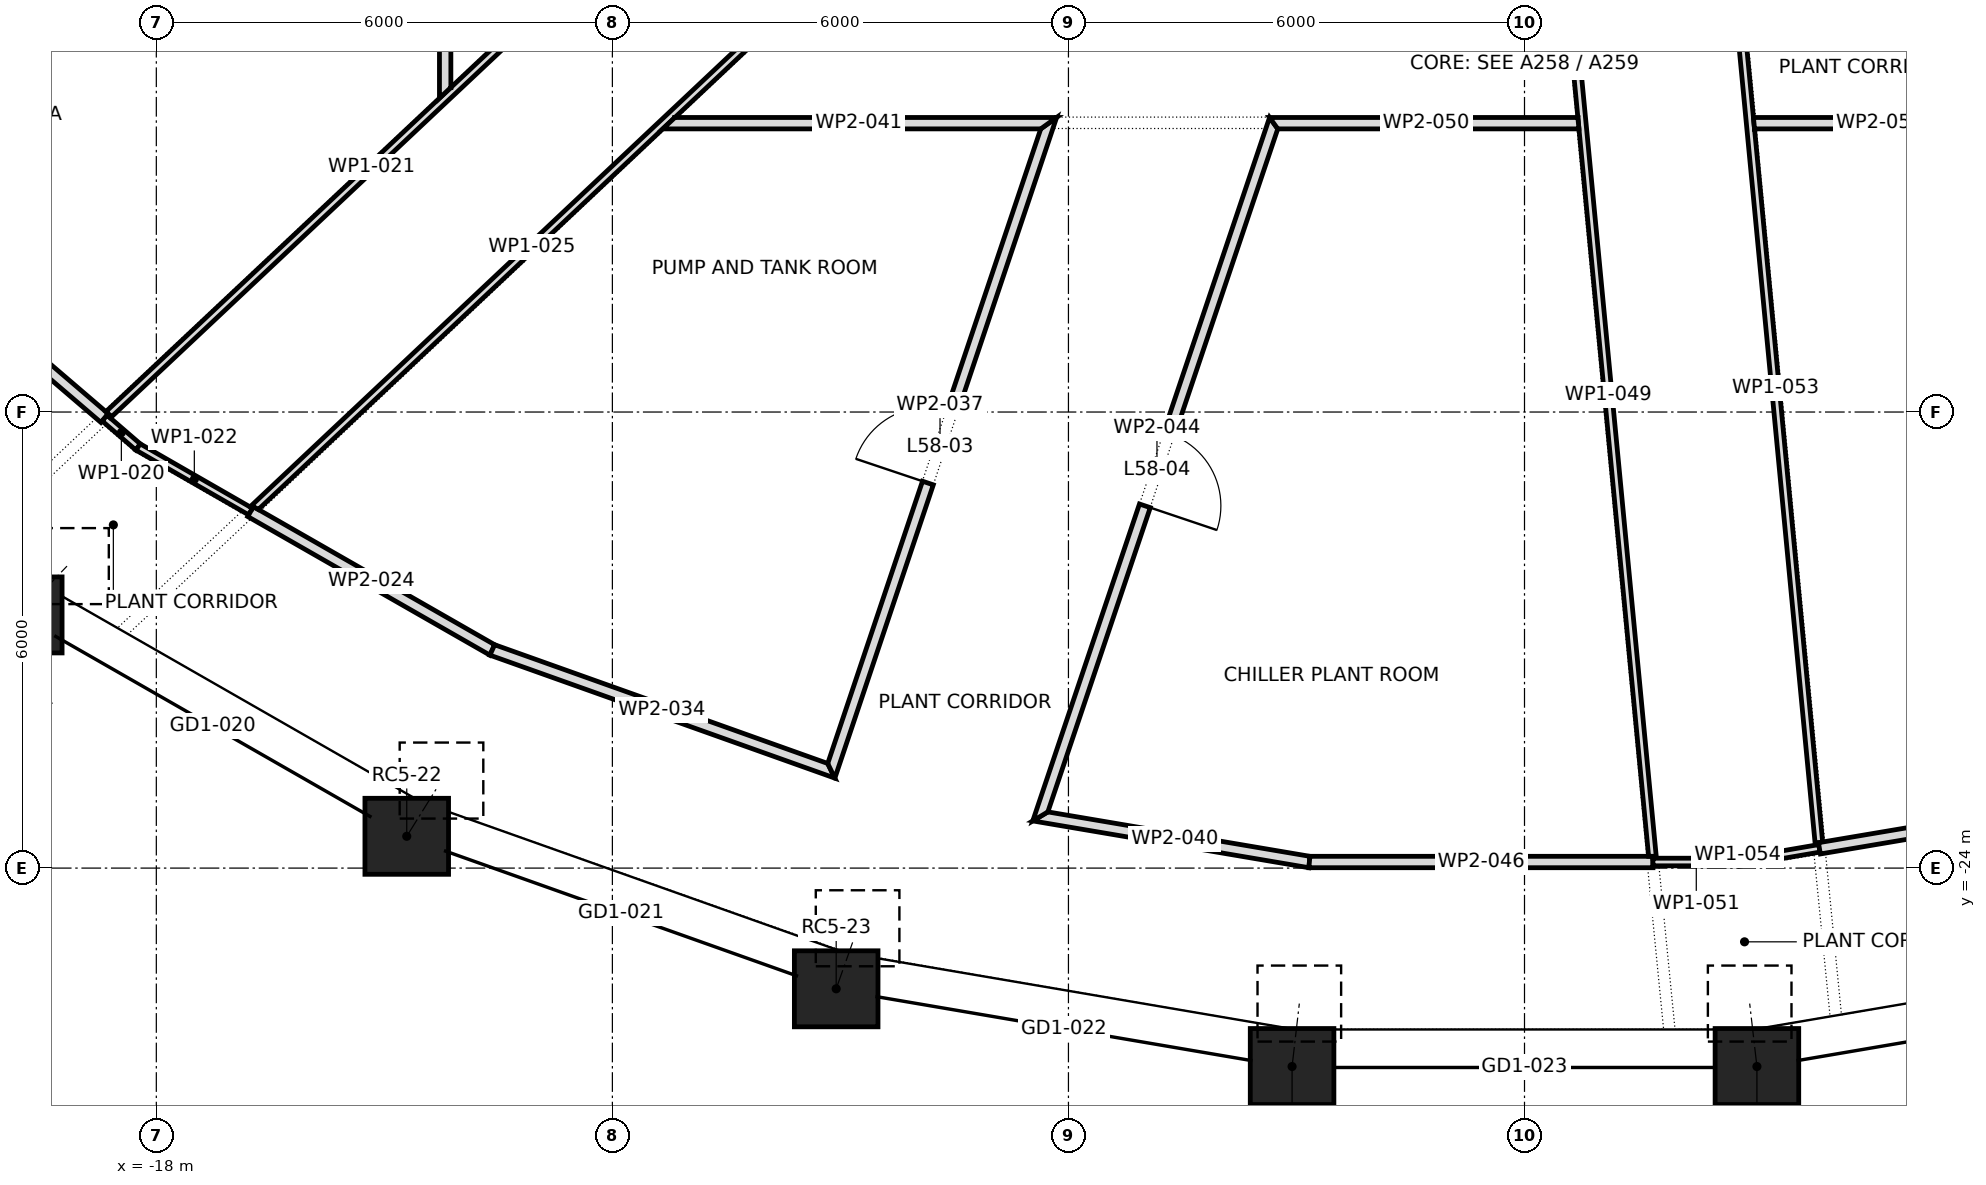
"""IFC4 building model, lengths in metres.
Left out: names, types, materials, properties, quantities, classifications, styles, units other than length and angle.
Written with IfcOpenShell. Run it as: python <this file> out.ifc"""

import sys

from ifc_helpers import new_model, si_unit, direction, frame, frame_2d, origin, origin_2d, place, context, subcontext, project, spatial, polyline, rectangle, outline, extrude, element, fill, save


model = new_model("IFC4")
c1 = context("Model", 3, precision=1e-05, world=origin(), true_north=direction((0.0, 1.0)))
c2 = subcontext(c1, "Body", "Model", "MODEL_VIEW")
j1 = project(units=[si_unit("LENGTHUNIT", "METRE"), si_unit("PLANEANGLEUNIT", "RADIAN")], contexts=[c1])
p1 = place(None, origin())
s1 = spatial("IfcSite", under=j1, at=p1, CompositionType="ELEMENT")
p2 = place(p1, origin())
s2 = spatial("IfcBuilding", under=s1, at=p2, CompositionType="ELEMENT")
p3 = place(p2, frame((0.0, 0.0, 250.9)))
s3 = spatial("IfcBuildingStorey", under=s2, at=p3, CompositionType="ELEMENT", Elevation=250.9)
p4 = place(p3, frame((-19.79, -20.669, 0.083), z_axis=(0.115812481815, 0.12096379157, 0.985877898213), x_axis=(-0.722319686129, 0.691559304059, 0.0)))
e1 = element("IfcColumn", 1, at=p4, inside=s3, PredefinedType="COLUMN", context=c2, shape_type="SweptSolid", body=[
    extrude(rectangle(XDim=1.1, YDim=1.0, at=origin_2d()), origin(), (0.0, 0.0, 1.0), 5.308),
])
p5 = place(p3, frame((-14.705, -23.582, 0.081), z_axis=(0.086092626008, 0.138152910538, 0.986661964939), x_axis=(-0.848695936688, 0.528881089707, 0.0)))
e2 = element("IfcColumn", 2, at=p5, inside=s3, PredefinedType="COLUMN", context=c2, shape_type="SweptSolid", body=[
    extrude(rectangle(XDim=1.1, YDim=1.0, at=origin_2d()), origin(), (0.0, 0.0, 1.0), 5.309),
])
p6 = place(p3, frame((-9.056, -25.588, 0.079), z_axis=(0.053067495482, 0.149959361151, 0.987266950184), x_axis=(-0.942712482292, 0.333606318481, 0.0)))
e3 = element("IfcColumn", 3, at=p6, inside=s3, PredefinedType="COLUMN", context=c2, shape_type="SweptSolid", body=[
    extrude(rectangle(XDim=1.1, YDim=1.0, at=origin_2d()), origin(), (0.0, 0.0, 1.0), 5.309),
])
for number, where, z_axis, x_axis in (
    (4, (-3.058, -26.611, 0.078), (0.018, 0.156, 0.988), (-0.993, 0.115, 0.0)),
    (5, (3.058, -26.611, 0.078), (-0.018, 0.156, 0.988), (-0.993, -0.115, 0.0)),
):
    element("IfcColumn", number, at=place(p3, frame(where, z_axis=z_axis, x_axis=x_axis)), inside=s3, PredefinedType="COLUMN", context=c2, shape_type="SweptSolid", body=[
        extrude(rectangle(XDim=1.1, YDim=1.0, at=origin_2d()), origin(), (0.0, 0.0, 1.0), 5.309),
    ])
p7 = place(p3, frame((-22.166, -15.095, 0.0), z_axis=(0.0, 0.0, 1.0), x_axis=(0.759579459862, -0.650414517178, 0.0)))
e6 = element("IfcWall", 6, at=p7, inside=s3, PredefinedType="PARTITIONING", context=c2, shape_type="SweptSolid", body=[
    extrude(outline(polyline([(4.589, 0.075), (3.064, 0.075), (1.54, 0.075), (0.015, 0.075), (0.0, -0.074), (0.0, -0.075), (1.53, -0.075), (3.059, -0.075), (4.589, -0.075), (4.589, 0.075)])), origin(), (0.0, 0.0, 1.0), 5.1),
])
p8 = place(p3, frame((-18.68, -18.08, 0.0), z_axis=(0.0, 0.0, 1.0), x_axis=(0.756869836798, -0.653565643333, 0.0)))
e7 = element("IfcWall", 7, at=p8, inside=s3, PredefinedType="PARTITIONING", context=c2, shape_type="SweptSolid", body=[
    extrude(outline(polyline([(0.0, -0.05), (0.586, -0.05), (0.576, 0.05), (0.0, 0.05), (0.0, -0.05)])), origin(), (0.0, 0.0, 1.0), 5.1),
])
p9 = place(p3, frame((-18.64, -18.042, 0.0), z_axis=(0.0, 0.0, 1.0), x_axis=(0.728698028808, 0.684835150099, 0.0)))
e8 = element("IfcWall", 8, at=p9, inside=s3, PredefinedType="PARTITIONING", context=c2, shape_type="SweptSolid", body=[
    extrude(outline(polyline([(9.523, 0.05), (7.883, 0.05), (6.242, 0.05), (6.241, 0.049), (6.24, 0.05), (4.683, 0.05), (3.127, 0.05), (1.571, 0.05), (0.015, 0.05), (0.019, 0.008), (0.0, 0.006), (0.0, -0.05), (0.0, -0.05), (1.905, -0.05), (3.809, -0.05), (5.714, -0.05), (7.619, -0.05), (9.523, -0.05), (9.523, 0.05)])), origin(), (0.0, 0.0, 1.0), 5.1),
])
p10 = place(p3, frame((-18.244, -18.458, 0.0), z_axis=(0.0, 0.0, 1.0), x_axis=(0.867117340005, -0.498103923556, 0.0)))
e9 = element("IfcWall", 9, at=p10, inside=s3, PredefinedType="PARTITIONING", context=c2, shape_type="SweptSolid", body=[
    extrude(outline(polyline([(1.712, 0.05), (0.01, 0.05), (0.0, -0.05), (1.712, -0.05), (1.712, 0.05)])), origin(), (0.0, 0.0, 1.0), 5.1),
])
p11 = place(p3, frame((-16.76, -19.31, 0.0), z_axis=(0.0, 0.0, 1.0), x_axis=(0.867915509179, -0.496711857043, 0.0)))
e10 = element("IfcWall", 10, at=p11, inside=s3, PredefinedType="PARTITIONING", context=c2, shape_type="SweptSolid", body=[
    extrude(outline(polyline([(0.0, -0.075), (1.835, -0.075), (3.671, -0.075), (3.657, 0.075), (1.829, 0.075), (0.0, 0.075), (0.0, -0.075)])), origin(), (0.0, 0.0, 1.0), 5.1),
])
p12 = place(p3, frame((-16.733, -19.284, 0.0), z_axis=(0.0, 0.0, 1.0), x_axis=(0.728239899896, 0.685322295128, 0.0)))
e11 = element("IfcWall", 11, at=p12, inside=s3, PredefinedType="PARTITIONING", context=c2, shape_type="SweptSolid", body=[
    extrude(outline(polyline([(0.056, -0.05), (1.937, -0.05), (3.817, -0.05), (5.697, -0.05), (7.578, -0.05), (7.579, -0.048), (7.581, -0.05), (10.057, -0.05), (10.057, 0.05), (8.381, 0.05), (6.705, 0.05), (5.029, 0.05), (3.353, 0.05), (1.676, 0.05), (0.0, 0.05), (0.0, 0.048), (0.01, 0.015), (0.034, 0.022), (0.056, -0.05)])), origin(), (0.0, 0.0, 1.0), 5.1),
])
p13 = place(p3, frame((-14.2, -13.873, 0.0), z_axis=(0.0, 0.0, 1.0), x_axis=(0.0, 1.0, 0.0)))
e12 = element("IfcWall", 12, at=p13, inside=s3, PredefinedType="PARTITIONING", context=c2, shape_type="SweptSolid", body=[
    extrude(outline(polyline([(5.374, -0.075), (5.374, -0.075), (5.252, 0.0), (5.132, 0.075), (3.422, 0.075), (1.711, 0.075), (0.001, 0.075), (0.142, -0.075), (1.886, -0.075), (3.63, -0.075), (5.374, -0.075)])), origin(), (0.0, 0.0, 1.0), 5.1),
])
p14 = place(p3, frame((-14.092, -8.566, 0.0), z_axis=(0.0, 0.0, 1.0), x_axis=(-0.89557562224, -0.444909322053, 0.0)))
e13 = element("IfcWall", 13, at=p14, inside=s3, PredefinedType="PARTITIONING", context=c2, shape_type="SweptSolid", body=[
    extrude(outline(polyline([(10.687, -0.075), (10.687, -0.075), (10.503, 0.075), (8.793, 0.075), (7.083, 0.075), (5.373, 0.075), (3.662, 0.075), (1.952, 0.075), (0.242, 0.075), (0.0, -0.075), (1.781, -0.075), (3.562, -0.075), (5.344, -0.075), (7.125, -0.075), (8.906, -0.075), (10.687, -0.075)])), origin(), (0.0, 0.0, 1.0), 5.1),
])
p15 = place(p14, frame((4.858, 0.0, 0.0)))
e14 = element("IfcOpeningElement", 14, at=p15, cuts=e13, PredefinedType="OPENING", context=c2, shape_type="SweptSolid", body=[
    extrude(rectangle(XDim=1.0, YDim=2.1, at=frame_2d((0.5, 1.05))), frame((0.0, 0.087, 0.0), z_axis=(0.0, -1.0, 0.0), x_axis=(1.0, 0.0, 0.0)), (0.0, 0.0, 1.0), 0.174),
])
p16 = place(p3, frame((-13.586, -21.128, 0.0), z_axis=(0.0, 0.0, 1.0), x_axis=(0.941927496084, -0.335816307109, 0.0)))
e15 = element("IfcWall", 15, at=p16, inside=s3, PredefinedType="PARTITIONING", context=c2, shape_type="SweptSolid", body=[
    extrude(outline(polyline([(4.818, -0.075), (4.818, -0.075), (4.665, 0.075), (3.115, 0.075), (1.564, 0.075), (0.013, 0.075), (0.0, -0.074), (0.0, -0.075), (1.606, -0.075), (3.212, -0.075), (4.818, -0.075)])), origin(), (0.0, 0.0, 1.0), 5.1),
])
p17 = place(p3, frame((-9.144, -22.792, 0.0), z_axis=(0.0, 0.0, 1.0), x_axis=(0.318224288807, 0.948015454522, 0.0)))
e16 = element("IfcWall", 16, at=p17, inside=s3, PredefinedType="PARTITIONING", context=c2, shape_type="SweptSolid", body=[
    extrude(outline(polyline([(0.0, -0.075), (1.833, -0.075), (3.667, -0.075), (5.501, -0.075), (7.334, -0.075), (9.168, -0.075), (8.959, 0.075), (7.198, 0.075), (5.437, 0.075), (3.676, 0.075), (1.914, 0.075), (0.153, 0.075), (0.0, -0.075)])), origin(), (0.0, 0.0, 1.0), 5.1),
])
p18 = place(p17, frame((4.07, 0.0, 0.0)))
e17 = element("IfcOpeningElement", 17, at=p18, cuts=e16, PredefinedType="OPENING", context=c2, shape_type="SweptSolid", body=[
    extrude(rectangle(XDim=1.0, YDim=2.1, at=frame_2d((0.5, 1.05))), frame((0.0, 0.087, 0.0), z_axis=(0.0, -1.0, 0.0), x_axis=(1.0, 0.0, 0.0)), (0.0, 0.0, 1.0), 0.174),
])
p19 = place(p3, frame((-6.457, -23.305, 0.0), z_axis=(0.0, 0.0, 1.0), x_axis=(0.985938927693, -0.16710604675, 0.0)))
e18 = element("IfcWall", 18, at=p19, inside=s3, PredefinedType="PARTITIONING", context=c2, shape_type="SweptSolid", body=[
    extrude(outline(polyline([(0.0, -0.075), (1.842, -0.075), (3.685, -0.075), (3.672, 0.075), (1.924, 0.075), (0.175, 0.075), (0.0, -0.075), (0.0, -0.075)])), origin(), (0.0, 0.0, 1.0), 5.1),
])
p20 = place(p3, frame((-6.156, -14.2, 0.0), z_axis=(0.0, 0.0, 1.0), x_axis=(-1.0, 0.0, 0.0)))
e19 = element("IfcWall", 19, at=p20, inside=s3, PredefinedType="PARTITIONING", context=c2, shape_type="SweptSolid", body=[
    extrude(outline(polyline([(0.0, -0.075), (1.674, -0.075), (3.348, -0.075), (5.021, -0.075), (5.181, 0.075), (3.523, 0.075), (1.866, 0.075), (0.208, 0.075), (0.104, 0.0), (0.0, -0.075), (0.0, -0.075)])), origin(), (0.0, 0.0, 1.0), 5.1),
])
p21 = place(p3, frame((-3.283, -14.149, 0.0), z_axis=(0.0, 0.0, 1.0), x_axis=(-0.319031661874, -0.947744057603, 0.0)))
e20 = element("IfcWall", 20, at=p21, inside=s3, PredefinedType="PARTITIONING", context=c2, shape_type="SweptSolid", body=[
    extrude(outline(polyline([(0.0, -0.075), (1.953, -0.075), (3.906, -0.075), (5.859, -0.075), (7.812, -0.075), (9.764, -0.075), (9.589, 0.075), (7.693, 0.075), (5.796, 0.075), (3.9, 0.075), (2.004, 0.075), (0.108, 0.075), (0.0, -0.075)])), origin(), (0.0, 0.0, 1.0), 5.1),
])
p22 = place(p21, frame((4.365, 0.0, 0.0)))
e21 = element("IfcOpeningElement", 21, at=p22, cuts=e20, PredefinedType="OPENING", context=c2, shape_type="SweptSolid", body=[
    extrude(rectangle(XDim=1.0, YDim=2.1, at=frame_2d((0.5, 1.05))), frame((0.0, 0.087, 0.0), z_axis=(0.0, -1.0, 0.0), x_axis=(1.0, 0.0, 0.0)), (0.0, 0.0, 1.0), 0.174),
])
p23 = place(p3, frame((-2.836, -23.92, 0.0), z_axis=(0.0, 0.0, 1.0), x_axis=(1.0, 0.0, 0.0)))
e22 = element("IfcWall", 22, at=p23, inside=s3, PredefinedType="PARTITIONING", context=c2, shape_type="SweptSolid", body=[
    extrude(outline(polyline([(4.526, 0.075), (3.021, 0.075), (1.517, 0.075), (0.012, 0.075), (0.0, -0.073), (0.0, -0.075), (1.509, -0.075), (3.017, -0.075), (4.526, -0.075), (4.526, 0.075)])), origin(), (0.0, 0.0, 1.0), 5.1),
])
p24 = place(p3, frame((0.52, -11.7, 0.0), z_axis=(0.0, 0.0, 1.0), x_axis=(0.095316823635, -0.995446986601, 0.0)))
e23 = element("IfcWall", 23, at=p24, inside=s3, PredefinedType="PARTITIONING", context=c2, shape_type="SweptSolid", body=[
    extrude(outline(polyline([(0.0, -0.05), (2.431, -0.05), (2.431, -0.05), (2.437, -0.05), (4.389, -0.05), (6.341, -0.05), (8.292, -0.05), (10.244, -0.05), (12.196, -0.05), (12.201, 0.007), (12.226, 0.005), (12.23, 0.05), (12.23, 0.05), (10.483, 0.05), (8.736, 0.05), (6.989, 0.05), (5.242, 0.05), (3.494, 0.05), (1.747, 0.05), (0.0, 0.05), (0.0, -0.05)])), origin(), (0.0, 0.0, 1.0), 5.1),
])
p25 = place(p3, frame((0.716, -14.2, 0.0), z_axis=(0.0, 0.0, 1.0), x_axis=(-1.0, 0.0, 0.0)))
e24 = element("IfcWall", 24, at=p25, inside=s3, PredefinedType="PARTITIONING", context=c2, shape_type="SweptSolid", body=[
    extrude(outline(polyline([(0.014, -0.075), (1.366, -0.075), (2.718, -0.075), (4.07, -0.075), (4.016, 0.0), (3.962, 0.075), (1.981, 0.075), (0.0, 0.075), (0.0, 0.072), (0.014, -0.075)])), origin(), (0.0, 0.0, 1.0), 5.1),
])
p26 = place(p3, frame((1.69, -23.92, 0.0), z_axis=(0.0, 0.0, 1.0), x_axis=(1.0, 0.0, 0.0)))
e25 = element("IfcWall", 25, at=p26, inside=s3, PredefinedType="PARTITIONING", context=c2, shape_type="SweptSolid", body=[
    extrude(outline(polyline([(1.144, -0.05), (1.144, -0.05), (1.136, 0.05), (0.0, 0.05), (0.0, -0.05), (1.144, -0.05)])), origin(), (0.0, 0.0, 1.0), 5.1),
])
p27 = place(p3, frame((2.73, -11.7, 0.0), z_axis=(0.0, 0.0, 1.0), x_axis=(0.095076842023, -0.995469936317, 0.0)))
e26 = element("IfcWall", 26, at=p27, inside=s3, PredefinedType="PARTITIONING", context=c2, shape_type="SweptSolid", body=[
    extrude(outline(polyline([(12.048, -0.05), (12.048, -0.049), (12.045, -0.004), (12.048, -0.003), (12.048, -0.003), (12.02, -0.005), (12.016, 0.05), (10.131, 0.05), (8.246, 0.05), (6.361, 0.05), (4.476, 0.05), (2.592, 0.05), (2.592, 0.049), (2.579, 0.05), (1.29, 0.05), (0.0, 0.05), (0.0, -0.05), (1.721, -0.05), (3.442, -0.05), (5.164, -0.05), (6.885, -0.05), (8.606, -0.05), (10.327, -0.05), (12.048, -0.05)])), origin(), (0.0, 0.0, 1.0), 5.1),
])
p28 = place(p3, frame((2.826, -23.921, 0.0), z_axis=(0.0, 0.0, 1.0), x_axis=(0.985630942271, 0.168913130449, 0.0)))
e27 = element("IfcWall", 27, at=p28, inside=s3, PredefinedType="PARTITIONING", context=c2, shape_type="SweptSolid", body=[
    extrude(outline(polyline([(1.07, 0.05), (0.009, 0.05), (0.0, -0.05), (1.07, -0.05), (1.07, 0.05)])), origin(), (0.0, 0.0, 1.0), 5.1),
])
p29 = place(p3, frame((3.88, -23.74, 0.0), z_axis=(0.0, 0.0, 1.0), x_axis=(0.986040852246, 0.166503566632, 0.0)))
e28 = element("IfcWall", 28, at=p29, inside=s3, PredefinedType="PARTITIONING", context=c2, shape_type="SweptSolid", body=[
    extrude(outline(polyline([(4.57, -0.075), (4.57, -0.074), (4.557, 0.075), (3.038, 0.075), (1.519, 0.075), (0.0, 0.075), (0.0, -0.075), (1.523, -0.075), (3.047, -0.075), (4.57, -0.075)])), origin(), (0.0, 0.0, 1.0), 5.1),
])
p30 = place(p29, frame((1.782, 0.0, 0.0)))
e29 = element("IfcOpeningElement", 29, at=p30, cuts=e28, PredefinedType="OPENING", context=c2, shape_type="SweptSolid", body=[
    extrude(rectangle(XDim=1.0, YDim=2.1, at=frame_2d((0.5, 1.05))), frame((0.0, 0.087, 0.0), z_axis=(0.0, -1.0, 0.0), x_axis=(1.0, 0.0, 0.0)), (0.0, 0.0, 1.0), 0.174),
])
p31 = place(p3, frame((6.364, -14.2, 0.0), z_axis=(0.0, 0.0, 1.0), x_axis=(-1.0, 0.0, 0.0)))
e30 = element("IfcWall", 30, at=p31, inside=s3, PredefinedType="PARTITIONING", context=c2, shape_type="SweptSolid", body=[
    extrude(outline(polyline([(3.352, -0.075), (3.352, -0.074), (3.338, 0.075), (1.713, 0.075), (0.088, 0.075), (0.044, 0.0), (0.0, -0.075), (1.676, -0.075), (3.352, -0.075)])), origin(), (0.0, 0.0, 1.0), 5.1),
])
p32 = place(p18, origin())
e31 = element("IfcDoor", 31, at=p32, inside=s3, OperationType="SINGLE_SWING_RIGHT", PredefinedType="DOOR", context=c2, shape_type="SweptSolid", body=[
    extrude(rectangle(XDim=1.0, YDim=2.1, at=frame_2d((0.5, 1.05))), frame((0.0, 0.025, 0.0), z_axis=(0.0, -1.0, 0.0), x_axis=(1.0, 0.0, 0.0)), (0.0, 0.0, 1.0), 0.05),
])
fill(e17, e31)
p33 = place(p22, origin())
e32 = element("IfcDoor", 32, at=p33, inside=s3, OperationType="SINGLE_SWING_LEFT", PredefinedType="DOOR", context=c2, shape_type="SweptSolid", body=[
    extrude(rectangle(XDim=1.0, YDim=2.1, at=frame_2d((0.5, 1.05))), frame((0.0, 0.025, 0.0), z_axis=(0.0, -1.0, 0.0), x_axis=(1.0, 0.0, 0.0)), (0.0, 0.0, 1.0), 0.05),
])
fill(e21, e32)
save(model, sys.argv[1])
